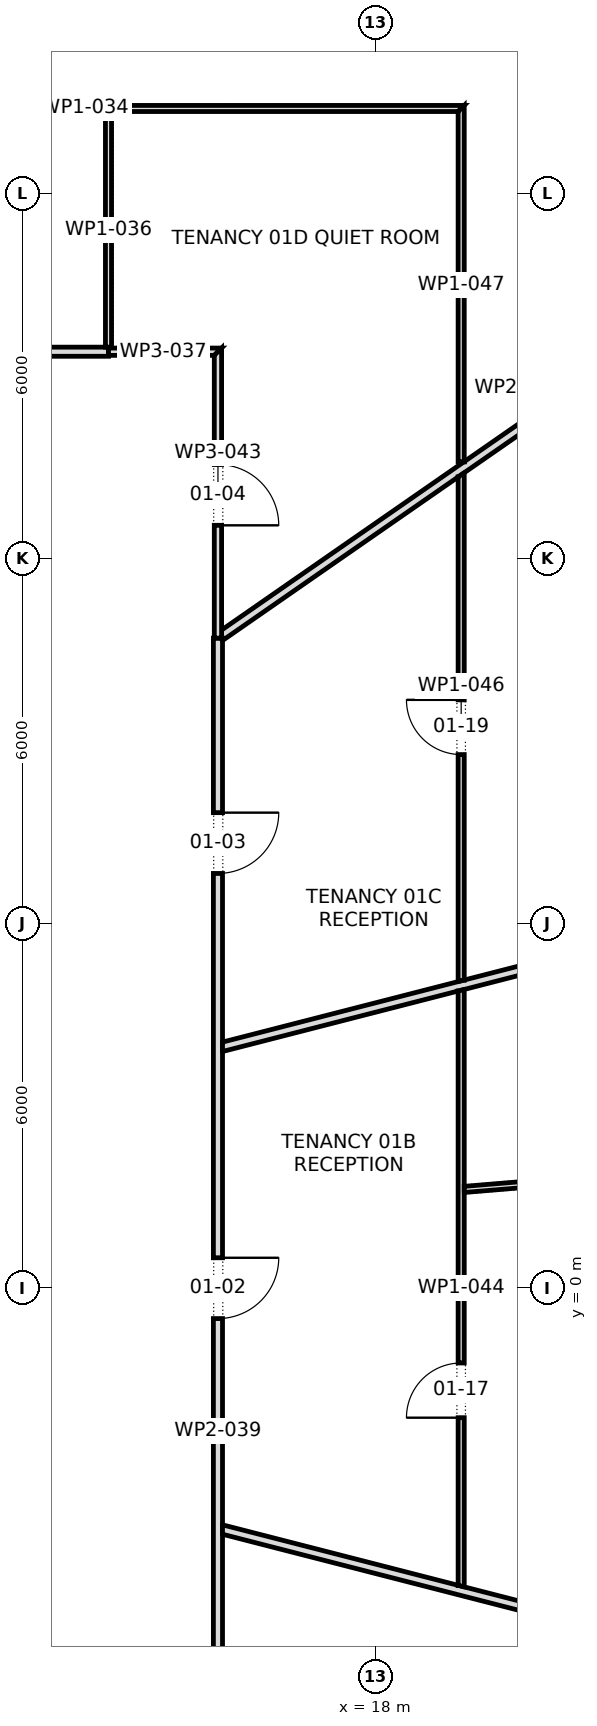
"""IFC4 building model, lengths in metres.
Left out: names, types, materials, properties, quantities, classifications, styles, units other than length and angle.
Written with IfcOpenShell. Run it as: python <this file> out.ifc"""

import sys

from ifc_helpers import new_model, si_unit, direction, frame, frame_2d, origin, place, context, subcontext, project, spatial, polyline, rectangle, outline, extrude, element, fill, save


model = new_model("IFC4")
c1 = context("Model", 3, precision=1e-05, world=origin(), true_north=direction((0.0, 1.0)))
c2 = subcontext(c1, "Body", "Model", "MODEL_VIEW")
j1 = project(units=[si_unit("LENGTHUNIT", "METRE"), si_unit("PLANEANGLEUNIT", "RADIAN")], contexts=[c1])
p1 = place(None, origin())
s1 = spatial("IfcSite", under=j1, at=p1, CompositionType="ELEMENT")
p2 = place(p1, origin())
s2 = spatial("IfcBuilding", under=s1, at=p2, CompositionType="ELEMENT")
p3 = place(p2, frame((0.0, 0.0, 27.7)))
s3 = spatial("IfcBuildingStorey", under=s2, at=p3, CompositionType="ELEMENT", Elevation=27.7)
p4 = place(p3, frame((-9.73, 15.4, 0.0), z_axis=(0.0, 0.0, 1.0), x_axis=(1.0, 0.0, 0.0)))
e1 = element("IfcWall", 1, at=p4, inside=s3, PredefinedType="PARTITIONING", context=c2, shape_type="SweptSolid", body=[
    extrude(rectangle(XDim=23.33, YDim=0.15, at=frame_2d((11.665, 0.0))), origin(), (0.0, 0.0, 1.0), 3.9),
])
p5 = place(p4, frame((18.79, 0.0, 0.0)))
e2 = element("IfcOpeningElement", 2, at=p5, cuts=e1, PredefinedType="OPENING", context=c2, shape_type="SweptSolid", body=[
    extrude(rectangle(XDim=1.0, YDim=2.1, at=frame_2d((0.5, 1.05))), frame((0.0, 0.087, 0.0), z_axis=(0.0, -1.0, 0.0), x_axis=(1.0, 0.0, 0.0)), (0.0, 0.0, 1.0), 0.174),
])
p6 = place(p4, frame((10.175, 0.0, 0.0)))
e3 = element("IfcOpeningElement", 3, at=p6, cuts=e1, PredefinedType="OPENING", context=c2, shape_type="SweptSolid", body=[
    extrude(rectangle(XDim=1.0, YDim=2.1, at=frame_2d((0.5, 1.05))), frame((0.0, 0.087, 0.0), z_axis=(0.0, -1.0, 0.0), x_axis=(1.0, 0.0, 0.0)), (0.0, 0.0, 1.0), 0.174),
])
p7 = place(p4, frame((2.55, 0.0, 0.0)))
e4 = element("IfcOpeningElement", 4, at=p7, cuts=e1, PredefinedType="OPENING", context=c2, shape_type="SweptSolid", body=[
    extrude(rectangle(XDim=1.0, YDim=2.1, at=frame_2d((0.5, 1.05))), frame((0.0, 0.087, 0.0), z_axis=(0.0, -1.0, 0.0), x_axis=(1.0, 0.0, 0.0)), (0.0, 0.0, 1.0), 0.174),
])
p8 = place(p3, frame((7.018, 19.4, 0.0), z_axis=(0.0, 0.0, 1.0), x_axis=(1.0, 0.0, 0.0)))
e5 = element("IfcWall", 5, at=p8, inside=s3, PredefinedType="PARTITIONING", context=c2, shape_type="SweptSolid", body=[
    extrude(outline(polyline([(0.0, -0.05), (1.633, -0.05), (3.266, -0.05), (4.899, -0.05), (6.532, -0.05), (6.532, -0.05), (6.632, -0.05), (6.632, -0.05), (8.532, -0.05), (10.432, -0.05), (12.332, -0.05), (12.332, -0.05), (12.432, 0.05), (10.661, 0.05), (8.89, 0.05), (7.119, 0.05), (5.348, 0.05), (3.577, 0.05), (1.807, 0.05), (0.036, 0.05), (0.0, -0.049), (0.0, -0.05)])), origin(), (0.0, 0.0, 1.0), 3.9),
])
p9 = place(p8, frame((2.812, 0.0, 0.0)))
e6 = element("IfcOpeningElement", 6, at=p9, cuts=e5, PredefinedType="OPENING", context=c2, shape_type="SweptSolid", body=[
    extrude(rectangle(XDim=0.9, YDim=2.1, at=frame_2d((0.45, 1.05))), frame((0.0, 0.062, 0.0), z_axis=(0.0, -1.0, 0.0), x_axis=(1.0, 0.0, 0.0)), (0.0, 0.0, 1.0), 0.124),
])
p10 = place(p3, frame((13.6, 15.46, 0.0), z_axis=(0.0, 0.0, 1.0), x_axis=(0.0, 1.0, 0.0)))
e7 = element("IfcWall", 7, at=p10, inside=s3, PredefinedType="PARTITIONING", context=c2, shape_type="SweptSolid", body=[
    extrude(outline(polyline([(0.0, -0.05), (1.945, -0.05), (3.89, -0.05), (3.89, 0.05), (1.952, 0.05), (0.015, 0.05), (0.015, 0.0), (0.0, 0.0), (0.0, -0.05)])), origin(), (0.0, 0.0, 1.0), 3.9),
])
p11 = place(p3, frame((13.6, 15.4, 0.0), z_axis=(0.0, 0.0, 1.0), x_axis=(1.0, 0.0, 0.0)))
e8 = element("IfcWall", 8, at=p11, inside=s3, PredefinedType="PARTITIONING", context=c2, shape_type="SweptSolid", body=[
    extrude(outline(polyline([(0.0, -0.06), (1.74, -0.06), (1.86, 0.06), (0.0, 0.06), (0.0, -0.06)])), origin(), (0.0, 0.0, 1.0), 3.9),
])
p12 = place(p3, frame((15.4, -15.475, 0.0), z_axis=(0.0, 0.0, 1.0), x_axis=(0.0, 1.0, 0.0)))
e9 = element("IfcWall", 9, at=p12, inside=s3, PredefinedType="PARTITIONING", context=c2, shape_type="SweptSolid", body=[
    extrude(outline(polyline([(26.165, 0.075), (24.307, 0.075), (22.449, 0.075), (20.59, 0.075), (18.732, 0.075), (16.874, 0.075), (15.016, 0.075), (13.158, 0.075), (11.299, 0.075), (9.441, 0.075), (7.583, 0.075), (5.725, 0.075), (3.866, 0.075), (2.008, 0.075), (0.15, 0.075), (0.0, -0.075), (1.869, -0.075), (3.738, -0.075), (5.607, -0.075), (7.476, -0.075), (9.345, -0.075), (11.214, -0.075), (13.083, -0.075), (14.952, -0.075), (16.821, -0.075), (18.689, -0.075), (20.558, -0.075), (22.427, -0.075), (24.296, -0.075), (26.165, -0.075), (26.165, 0.075)])), origin(), (0.0, 0.0, 1.0), 3.9),
])
p13 = place(p12, frame((4.9, 0.0, 0.0)))
e10 = element("IfcOpeningElement", 10, at=p13, cuts=e9, PredefinedType="OPENING", context=c2, shape_type="SweptSolid", body=[
    extrude(rectangle(XDim=1.8, YDim=2.1, at=frame_2d((0.9, 1.05))), frame((0.0, 0.087, 0.0), z_axis=(0.0, -1.0, 0.0), x_axis=(1.0, 0.0, 0.0)), (0.0, 0.0, 1.0), 0.174),
])
p14 = place(p12, frame((14.975, 0.0, 0.0)))
e11 = element("IfcOpeningElement", 11, at=p14, cuts=e9, PredefinedType="OPENING", context=c2, shape_type="SweptSolid", body=[
    extrude(rectangle(XDim=1.0, YDim=2.1, at=frame_2d((0.5, 1.05))), frame((0.0, 0.087, 0.0), z_axis=(0.0, -1.0, 0.0), x_axis=(1.0, 0.0, 0.0)), (0.0, 0.0, 1.0), 0.174),
])
p15 = place(p12, frame((22.295, 0.0, 0.0)))
e12 = element("IfcOpeningElement", 12, at=p15, cuts=e9, PredefinedType="OPENING", context=c2, shape_type="SweptSolid", body=[
    extrude(rectangle(XDim=1.0, YDim=2.1, at=frame_2d((0.5, 1.05))), frame((0.0, 0.087, 0.0), z_axis=(0.0, -1.0, 0.0), x_axis=(1.0, 0.0, 0.0)), (0.0, 0.0, 1.0), 0.174),
])
p16 = place(p3, frame((15.457, -3.965, 0.0), z_axis=(0.0, 0.0, 1.0), x_axis=(0.968588981289, -0.248667218036, 0.0)))
e13 = element("IfcWall", 13, at=p16, inside=s3, PredefinedType="PARTITIONING", context=c2, shape_type="SweptSolid", body=[
    extrude(outline(polyline([(0.038, -0.075), (1.915, -0.075), (3.791, -0.075), (5.667, -0.075), (7.544, -0.075), (9.42, -0.075), (11.297, -0.075), (13.173, -0.075), (15.049, -0.075), (16.926, -0.075), (18.802, -0.075), (18.816, -0.008), (18.816, 0.075), (16.965, 0.075), (15.113, 0.075), (13.261, 0.075), (11.41, 0.075), (9.558, 0.075), (7.707, 0.075), (5.855, 0.075), (4.003, 0.075), (4.0, 0.074), (4.0, 0.075), (2.667, 0.075), (1.333, 0.075), (0.0, 0.075), (0.0, 0.073), (0.038, -0.075)])), origin(), (0.0, 0.0, 1.0), 2.892),
])
p17 = place(p3, frame((15.457, 3.965, 0.0), z_axis=(0.0, 0.0, 1.0), x_axis=(0.968588981289, 0.248667218036, 0.0)))
e14 = element("IfcWall", 14, at=p17, inside=s3, PredefinedType="PARTITIONING", context=c2, shape_type="SweptSolid", body=[
    extrude(outline(polyline([(0.0, -0.075), (1.333, -0.075), (2.667, -0.075), (4.0, -0.075), (4.0, -0.074), (4.003, -0.075), (5.855, -0.075), (7.707, -0.075), (9.558, -0.075), (11.41, -0.075), (13.261, -0.075), (15.113, -0.075), (16.965, -0.075), (18.816, -0.075), (18.816, 0.008), (18.802, 0.075), (16.97, 0.075), (15.137, 0.075), (13.305, 0.075), (11.472, 0.075), (9.64, 0.075), (7.807, 0.075), (5.975, 0.075), (4.142, 0.075), (4.141, 0.073), (4.133, 0.075), (2.768, 0.075), (1.403, 0.075), (0.038, 0.075), (0.0, -0.073), (0.0, -0.075)])), origin(), (0.0, 0.0, 1.0), 2.892),
])
p18 = place(p3, frame((15.433, 10.712, 0.0), z_axis=(0.0, 0.0, 1.0), x_axis=(0.82152236589, 0.570176290583, 0.0)))
e15 = element("IfcWall", 15, at=p18, inside=s3, PredefinedType="PARTITIONING", context=c2, shape_type="SweptSolid", body=[
    extrude(outline(polyline([(0.0, -0.075), (1.572, -0.075), (3.144, -0.075), (4.716, -0.075), (4.718, -0.073), (4.721, -0.075), (6.645, -0.075), (8.569, -0.075), (10.493, -0.075), (12.417, -0.075), (14.341, -0.075), (14.341, -0.074), (14.336, 0.0), (14.316, 0.075), (12.441, 0.075), (10.567, 0.075), (8.692, 0.075), (6.817, 0.075), (4.942, 0.075), (4.941, 0.073), (4.939, 0.075), (3.321, 0.075), (1.703, 0.075), (0.085, 0.075), (0.01, -0.034), (0.022, -0.042), (0.0, -0.074), (0.0, -0.075)])), origin(), (0.0, 0.0, 1.0), 2.91),
])
p19 = place(p3, frame((15.4, 15.46, 0.0), z_axis=(0.0, 0.0, 1.0), x_axis=(0.0, -1.0, 0.0)))
e16 = element("IfcWall", 16, at=p19, inside=s3, PredefinedType="PARTITIONING", context=c2, shape_type="SweptSolid", body=[
    extrude(outline(polyline([(4.77, 0.06), (3.18, 0.06), (1.59, 0.06), (0.0, 0.06), (0.12, -0.06), (1.67, -0.06), (3.22, -0.06), (4.77, -0.06), (4.77, 0.06)])), origin(), (0.0, 0.0, 1.0), 3.9),
])
p20 = place(p19, frame((1.915, 0.0, 0.0)))
e17 = element("IfcOpeningElement", 17, at=p20, cuts=e16, PredefinedType="OPENING", context=c2, shape_type="SweptSolid", body=[
    extrude(rectangle(XDim=1.0, YDim=2.1, at=frame_2d((0.5, 1.05))), frame((0.0, 0.072, 0.0), z_axis=(0.0, -1.0, 0.0), x_axis=(1.0, 0.0, 0.0)), (0.0, 0.0, 1.0), 0.144),
])
p21 = place(p3, frame((19.4, -4.912, 0.0), z_axis=(0.0, 0.0, 1.0), x_axis=(0.0, 1.0, 0.0)))
e18 = element("IfcWall", 18, at=p21, inside=s3, PredefinedType="PARTITIONING", context=c2, shape_type="SweptSolid", body=[
    extrude(outline(polyline([(9.824, -0.05), (9.824, -0.049), (9.799, 0.05), (7.844, 0.05), (5.889, 0.05), (3.935, 0.05), (1.98, 0.05), (0.026, 0.05), (0.0, -0.049), (0.0, -0.05), (1.965, -0.05), (3.93, -0.05), (5.895, -0.05), (7.859, -0.05), (9.824, -0.05)])), origin(), (0.0, 0.0, 1.0), 3.9),
])
p22 = place(p21, frame((2.782, 0.0, 0.0)))
e19 = element("IfcOpeningElement", 19, at=p22, cuts=e18, PredefinedType="OPENING", context=c2, shape_type="SweptSolid", body=[
    extrude(rectangle(XDim=0.9, YDim=2.1, at=frame_2d((0.45, 1.05))), frame((0.0, 0.062, 0.0), z_axis=(0.0, -1.0, 0.0), x_axis=(1.0, 0.0, 0.0)), (0.0, 0.0, 1.0), 0.124),
])
p23 = place(p3, frame((19.446, 1.624, 0.0), z_axis=(0.0, 0.0, 1.0), x_axis=(0.996584208703, 0.082582776438, 0.0)))
e20 = element("IfcWall", 20, at=p23, inside=s3, PredefinedType="PARTITIONING", context=c2, shape_type="SweptSolid", body=[
    extrude(outline(polyline([(15.633, -0.05), (15.633, 0.035), (15.631, 0.05), (13.678, 0.05), (11.725, 0.05), (9.772, 0.05), (7.819, 0.05), (5.866, 0.05), (3.914, 0.05), (1.961, 0.05), (0.008, 0.05), (0.0, -0.045), (0.0, -0.05), (1.954, -0.05), (3.908, -0.05), (5.862, -0.05), (7.816, -0.05), (9.771, -0.05), (11.725, -0.05), (13.679, -0.05), (15.633, -0.05)])), origin(), (0.0, 0.0, 1.0), 2.892),
])
p24 = place(p23, frame((7.496, 0.0, 0.0)))
e21 = element("IfcOpeningElement", 21, at=p24, cuts=e20, PredefinedType="OPENING", context=c2, shape_type="SweptSolid", body=[
    extrude(rectangle(XDim=0.9, YDim=2.1, at=frame_2d((0.45, 1.05))), frame((0.0, 0.062, 0.0), z_axis=(0.0, -1.0, 0.0), x_axis=(1.0, 0.0, 0.0)), (0.0, 0.0, 1.0), 0.124),
])
p25 = place(p3, frame((19.4, 13.409, 0.0), z_axis=(0.0, 0.0, 1.0), x_axis=(0.0, -1.0, 0.0)))
e22 = element("IfcWall", 22, at=p25, inside=s3, PredefinedType="PARTITIONING", context=c2, shape_type="SweptSolid", body=[
    extrude(outline(polyline([(8.367, -0.05), (8.367, -0.048), (8.342, 0.05), (6.673, 0.05), (5.005, 0.05), (3.337, 0.05), (1.668, 0.05), (0.0, 0.05), (0.0, 0.049), (0.069, -0.05), (1.729, -0.05), (3.388, -0.05), (5.048, -0.05), (6.707, -0.05), (8.367, -0.05)])), origin(), (0.0, 0.0, 1.0), 3.9),
])
p26 = place(p25, frame((3.734, 0.0, 0.0)))
e23 = element("IfcOpeningElement", 23, at=p26, cuts=e22, PredefinedType="OPENING", context=c2, shape_type="SweptSolid", body=[
    extrude(rectangle(XDim=0.9, YDim=2.1, at=frame_2d((0.45, 1.05))), frame((0.0, 0.062, 0.0), z_axis=(0.0, -1.0, 0.0), x_axis=(1.0, 0.0, 0.0)), (0.0, 0.0, 1.0), 0.124),
])
p27 = place(p3, frame((19.4, 19.45, 0.0), z_axis=(0.0, 0.0, 1.0), x_axis=(0.0, -1.0, 0.0)))
e24 = element("IfcWall", 24, at=p27, inside=s3, PredefinedType="PARTITIONING", context=c2, shape_type="SweptSolid", body=[
    extrude(outline(polyline([(5.86, 0.05), (3.906, 0.05), (1.953, 0.05), (0.0, 0.05), (0.1, -0.05), (2.02, -0.05), (3.94, -0.05), (5.86, -0.05), (5.86, 0.05)])), origin(), (0.0, 0.0, 1.0), 3.9),
])
p28 = place(p14, frame((1.0, 0.0, 0.0), z_axis=(0.0, 0.0, 1.0), x_axis=(-1.0, 0.0, 0.0)))
e25 = element("IfcDoor", 25, at=p28, inside=s3, OperationType="SINGLE_SWING_RIGHT", PredefinedType="DOOR", context=c2, shape_type="SweptSolid", body=[
    extrude(rectangle(XDim=1.0, YDim=2.1, at=frame_2d((0.5, 1.05))), frame((0.0, 0.025, 0.0), z_axis=(0.0, -1.0, 0.0), x_axis=(1.0, 0.0, 0.0)), (0.0, 0.0, 1.0), 0.05),
])
fill(e11, e25)
p29 = place(p15, frame((1.0, 0.0, 0.0), z_axis=(0.0, 0.0, 1.0), x_axis=(-1.0, 0.0, 0.0)))
e26 = element("IfcDoor", 26, at=p29, inside=s3, OperationType="SINGLE_SWING_RIGHT", PredefinedType="DOOR", context=c2, shape_type="SweptSolid", body=[
    extrude(rectangle(XDim=1.0, YDim=2.1, at=frame_2d((0.5, 1.05))), frame((0.0, 0.025, 0.0), z_axis=(0.0, -1.0, 0.0), x_axis=(1.0, 0.0, 0.0)), (0.0, 0.0, 1.0), 0.05),
])
fill(e12, e26)
p30 = place(p20, origin())
e27 = element("IfcDoor", 27, at=p30, inside=s3, OperationType="SINGLE_SWING_LEFT", PredefinedType="DOOR", context=c2, shape_type="SweptSolid", body=[
    extrude(rectangle(XDim=1.0, YDim=2.1, at=frame_2d((0.5, 1.05))), frame((0.0, 0.025, 0.0), z_axis=(0.0, -1.0, 0.0), x_axis=(1.0, 0.0, 0.0)), (0.0, 0.0, 1.0), 0.05),
])
fill(e17, e27)
p31 = place(p22, origin())
e28 = element("IfcDoor", 28, at=p31, inside=s3, OperationType="SINGLE_SWING_RIGHT", PredefinedType="DOOR", context=c2, shape_type="SweptSolid", body=[
    extrude(rectangle(XDim=0.9, YDim=2.1, at=frame_2d((0.45, 1.05))), frame((0.0, 0.025, 0.0), z_axis=(0.0, -1.0, 0.0), x_axis=(1.0, 0.0, 0.0)), (0.0, 0.0, 1.0), 0.05),
])
fill(e19, e28)
p32 = place(p26, frame((0.9, 0.0, 0.0), z_axis=(0.0, 0.0, 1.0), x_axis=(-1.0, 0.0, 0.0)))
e29 = element("IfcDoor", 29, at=p32, inside=s3, OperationType="SINGLE_SWING_LEFT", PredefinedType="DOOR", context=c2, shape_type="SweptSolid", body=[
    extrude(rectangle(XDim=0.9, YDim=2.1, at=frame_2d((0.45, 1.05))), frame((0.0, 0.025, 0.0), z_axis=(0.0, -1.0, 0.0), x_axis=(1.0, 0.0, 0.0)), (0.0, 0.0, 1.0), 0.05),
])
fill(e23, e29)
save(model, sys.argv[1])
